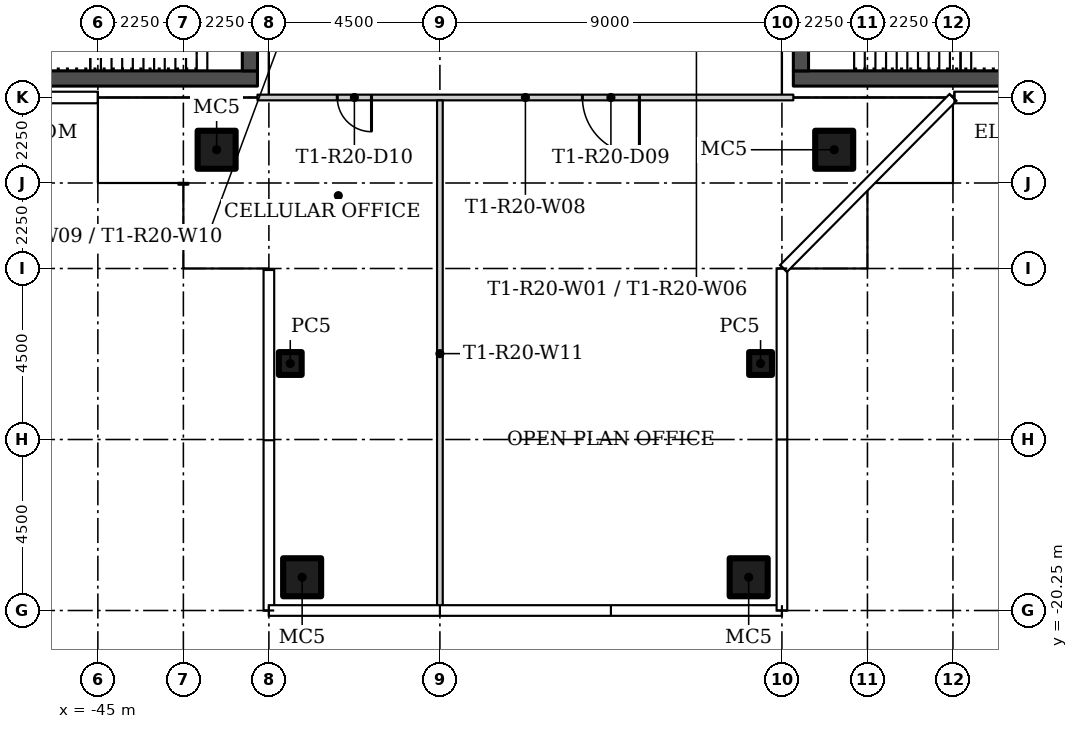
"""IFC4 building model, lengths in metres.
Left out: names, types, materials, properties, quantities, classifications, styles, units other than length and angle.
Written with IfcOpenShell. Run it as: python <this file> out.ifc"""

import sys

from ifc_helpers import new_model, si_unit, direction, frame, frame_2d, origin, origin_2d, place, context, subcontext, project, spatial, rectangle, hollow_rectangle, extrude, element, fill, save


model = new_model("IFC4")
c1 = context("Model", 3, precision=1e-05, world=origin(), true_north=direction((0.0, 1.0)))
c2 = subcontext(c1, "Body", "Model", "MODEL_VIEW")
j1 = project(units=[si_unit("LENGTHUNIT", "METRE"), si_unit("PLANEANGLEUNIT", "RADIAN")], contexts=[c1])
p1 = place(None, origin())
s1 = spatial("IfcSite", under=j1, at=p1, CompositionType="ELEMENT")
p2 = place(p1, origin())
s2 = spatial("IfcBuilding", under=s1, at=p2, CompositionType="ELEMENT")
p3 = place(p2, frame((0.0, 0.0, 186.6)))
s3 = spatial("IfcBuildingStorey", under=s2, at=p3, CompositionType="ELEMENT", Elevation=186.6)
for number, where in (
    (1, (-25.625, -8.125, 0.0)),
    (2, (-41.875, -8.125, 0.0)),
):
    element("IfcColumn", number, at=place(p3, frame(where)), inside=s3, PredefinedType="COLUMN", context=c2, shape_type="SweptSolid", body=[
        extrude(hollow_rectangle(XDim=1.0, YDim=1.0, WallThickness=0.04, at=origin_2d()), origin(), (0.0, 0.0, 1.0), 3.55),
    ])
p4 = place(p3, frame((-39.938, -13.75, 0.0)))
e3 = element("IfcColumn", 3, at=p4, inside=s3, PredefinedType="COLUMN", context=c2, shape_type="SweptSolid", body=[
    extrude(hollow_rectangle(XDim=0.6, YDim=0.6, WallThickness=0.02, at=origin_2d()), origin(), (0.0, 0.0, 1.0), 3.55),
])
p5 = place(p3, frame((-39.625, -19.375, 0.0)))
e4 = element("IfcColumn", 4, at=p5, inside=s3, PredefinedType="COLUMN", context=c2, shape_type="SweptSolid", body=[
    extrude(hollow_rectangle(XDim=1.0, YDim=1.0, WallThickness=0.04, at=origin_2d()), origin(), (0.0, 0.0, 1.0), 3.55),
])
p6 = place(p3, frame((-27.562, -13.75, 0.0)))
e5 = element("IfcColumn", 5, at=p6, inside=s3, PredefinedType="COLUMN", context=c2, shape_type="SweptSolid", body=[
    extrude(hollow_rectangle(XDim=0.6, YDim=0.6, WallThickness=0.02, at=origin_2d()), origin(), (0.0, 0.0, 1.0), 3.55),
])
p7 = place(p3, frame((-27.875, -19.375, 0.0)))
e6 = element("IfcColumn", 6, at=p7, inside=s3, PredefinedType="COLUMN", context=c2, shape_type="SweptSolid", body=[
    extrude(hollow_rectangle(XDim=1.0, YDim=1.0, WallThickness=0.04, at=origin_2d()), origin(), (0.0, 0.0, 1.0), 3.55),
])
p8 = place(p3, frame((-26.7, -6.75, 0.0), z_axis=(0.0, 0.0, 1.0), x_axis=(-1.0, 0.0, 0.0)))
e7 = element("IfcWall", 7, at=p8, inside=s3, PredefinedType="PARTITIONING", context=c2, shape_type="SweptSolid", body=[
    extrude(rectangle(XDim=14.1, YDim=0.15, at=frame_2d((7.05, 0.0))), origin(), (0.0, 0.0, 1.0), 3.55),
])
p9 = place(p8, frame((4.05, 0.0, 0.0)))
e8 = element("IfcOpeningElement", 8, at=p9, cuts=e7, PredefinedType="OPENING", context=c2, shape_type="SweptSolid", body=[
    extrude(rectangle(XDim=1.5, YDim=2.1, at=frame_2d((0.75, 1.05))), frame((0.0, 0.085, 0.0), z_axis=(0.0, -1.0, 0.0), x_axis=(1.0, 0.0, 0.0)), (0.0, 0.0, 1.0), 0.17),
])
p10 = place(p8, frame((11.1, 0.0, 0.0)))
e9 = element("IfcOpeningElement", 9, at=p10, cuts=e7, PredefinedType="OPENING", context=c2, shape_type="SweptSolid", body=[
    extrude(rectangle(XDim=0.9, YDim=2.1, at=frame_2d((0.45, 1.05))), frame((0.0, 0.085, 0.0), z_axis=(0.0, -1.0, 0.0), x_axis=(1.0, 0.0, 0.0)), (0.0, 0.0, 1.0), 0.17),
])
p11 = place(p3, frame((-36.0, -20.155, 0.0), z_axis=(0.0, 0.0, 1.0), x_axis=(0.0, 1.0, 0.0)))
e10 = element("IfcWall", 10, at=p11, inside=s3, PredefinedType="PARTITIONING", context=c2, shape_type="SweptSolid", body=[
    extrude(rectangle(XDim=13.33, YDim=0.15, at=frame_2d((6.665, 0.0))), origin(), (0.0, 0.0, 1.0), 3.55),
])
p12 = place(p3, frame((-26.7, -6.25, 0.0)))
e11 = element("IfcWall", 11, at=p12, inside=s3, PredefinedType="SHEAR", context=c2, shape_type="SweptSolid", body=[
    extrude(rectangle(XDim=12.9, YDim=0.4, at=frame_2d((6.45, 0.0))), origin(), (0.0, 0.0, 1.0), 3.55),
])
p13 = place(p3, frame((-26.5, 6.05, 0.0), z_axis=(0.0, 0.0, 1.0), x_axis=(0.0, -1.0, 0.0)))
e12 = element("IfcWall", 12, at=p13, inside=s3, PredefinedType="SHEAR", context=c2, shape_type="SweptSolid", body=[
    extrude(rectangle(XDim=12.1, YDim=0.4, at=frame_2d((6.05, 0.0))), origin(), (0.0, 0.0, 1.0), 3.55),
])
p14 = place(p13, frame((3.9, 0.0, 0.0)))
e13 = element("IfcOpeningElement", 13, at=p14, cuts=e12, PredefinedType="OPENING", context=c2, shape_type="SweptSolid", body=[
    extrude(rectangle(XDim=1.8, YDim=2.4, at=frame_2d((0.9, 1.2))), frame((0.0, 0.21, 0.0), z_axis=(0.0, -1.0, 0.0), x_axis=(1.0, 0.0, 0.0)), (0.0, 0.0, 1.0), 0.42),
])
p15 = place(p3, frame((-40.8, -6.25, 0.0), z_axis=(0.0, 0.0, 1.0), x_axis=(-1.0, 0.0, 0.0)))
e14 = element("IfcWall", 14, at=p15, inside=s3, PredefinedType="SHEAR", context=c2, shape_type="SweptSolid", body=[
    extrude(rectangle(XDim=12.9, YDim=0.4, at=frame_2d((6.45, 0.0))), origin(), (0.0, 0.0, 1.0), 3.55),
])
p16 = place(p3, frame((-41.0, -6.05, 0.0), z_axis=(0.0, 0.0, 1.0), x_axis=(0.0, 1.0, 0.0)))
e15 = element("IfcWall", 15, at=p16, inside=s3, PredefinedType="SHEAR", context=c2, shape_type="SweptSolid", body=[
    extrude(rectangle(XDim=12.1, YDim=0.4, at=frame_2d((6.05, 0.0))), origin(), (0.0, 0.0, 1.0), 3.55),
])
p17 = place(p16, frame((6.4, 0.0, 0.0)))
e16 = element("IfcOpeningElement", 16, at=p17, cuts=e15, PredefinedType="OPENING", context=c2, shape_type="SweptSolid", body=[
    extrude(rectangle(XDim=1.8, YDim=2.4, at=frame_2d((0.9, 1.2))), frame((0.0, 0.21, 0.0), z_axis=(0.0, -1.0, 0.0), x_axis=(1.0, 0.0, 0.0)), (0.0, 0.0, 1.0), 0.42),
])
p18 = place(p9, origin())
e17 = element("IfcDoor", 17, at=p18, inside=s3, OperationType="DOUBLE_DOOR_SINGLE_SWING", PredefinedType="DOOR", context=c2, shape_type="SweptSolid", body=[
    extrude(rectangle(XDim=1.5, YDim=2.1, at=frame_2d((0.75, 1.05))), frame((0.0, 0.025, 0.0), z_axis=(0.0, -1.0, 0.0), x_axis=(1.0, 0.0, 0.0)), (0.0, 0.0, 1.0), 0.05),
])
fill(e8, e17)
p19 = place(p10, origin())
e18 = element("IfcDoor", 18, at=p19, inside=s3, OperationType="SINGLE_SWING_LEFT", PredefinedType="DOOR", context=c2, shape_type="SweptSolid", body=[
    extrude(rectangle(XDim=0.9, YDim=2.1, at=frame_2d((0.45, 1.05))), frame((0.0, 0.025, 0.0), z_axis=(0.0, -1.0, 0.0), x_axis=(1.0, 0.0, 0.0)), (0.0, 0.0, 1.0), 0.05),
])
fill(e9, e18)
save(model, sys.argv[1])
